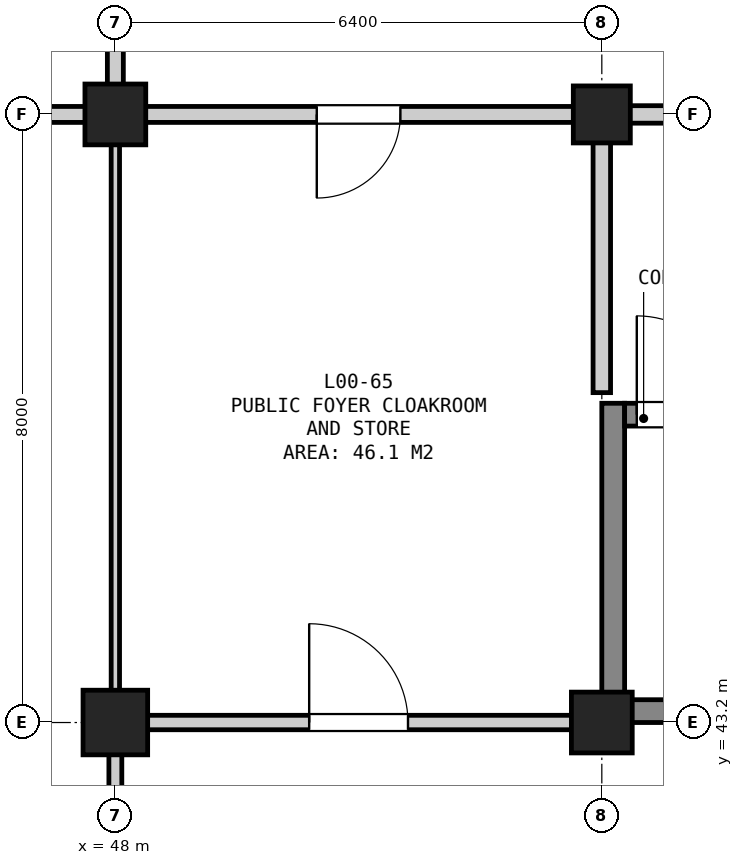
"""IFC4 building model, lengths in metres.
Left out: names, types, materials, properties, quantities, classifications, styles, units other than length and angle.
Written with IfcOpenShell. Run it as: python <this file> out.ifc"""

import sys

from ifc_helpers import new_model, si_unit, direction, frame, frame_2d, origin, origin_2d, place, context, subcontext, project, spatial, rectangle, extrude, element, fill, save


model = new_model("IFC4")
c1 = context("Model", 3, precision=1e-05, world=origin(), true_north=direction((0.0, 1.0)))
c2 = subcontext(c1, "Body", "Model", "MODEL_VIEW")
j1 = project(units=[si_unit("LENGTHUNIT", "METRE"), si_unit("PLANEANGLEUNIT", "RADIAN")], contexts=[c1])
p1 = place(None, origin())
s1 = spatial("IfcSite", under=j1, at=p1, CompositionType="ELEMENT")
p2 = place(p1, origin())
s2 = spatial("IfcBuilding", under=s1, at=p2, CompositionType="ELEMENT")
p3 = place(p2, origin())
s3 = spatial("IfcBuildingStorey", under=s2, at=p3, CompositionType="ELEMENT", Elevation=0.0)
p4 = place(p3, frame((48.0, 43.2, 0.0), z_axis=(0.0, 0.0, 1.0), x_axis=(1.0, 0.0, 0.0)))
e1 = element("IfcColumn", 1, at=p4, inside=s3, PredefinedType="COLUMN", context=c2, shape_type="SweptSolid", body=[
    extrude(rectangle(XDim=0.85, YDim=0.85, at=origin_2d()), origin(), (0.0, 0.0, 1.0), 5.4),
])
for number, where, z_axis, x_axis in (
    (2, (48.0, 51.2, 0.0), (0.0, 0.0, 1.0), (1.0, 0.0, 0.0)),
    (3, (54.4, 43.2, 0.0), (0.0, 0.0, 1.0), (1.0, 0.0, 0.0)),
):
    element("IfcColumn", number, at=place(p3, frame(where, z_axis=z_axis, x_axis=x_axis)), inside=s3, PredefinedType="COLUMN", context=c2, shape_type="SweptSolid", body=[
        extrude(rectangle(XDim=0.8, YDim=0.8, at=origin_2d()), origin(), (0.0, 0.0, 1.0), 5.4),
    ])
p5 = place(p3, frame((54.4, 51.2, 0.0), z_axis=(0.0, 0.0, 1.0), x_axis=(1.0, 0.0, 0.0)))
e4 = element("IfcColumn", 4, at=p5, inside=s3, PredefinedType="COLUMN", context=c2, shape_type="SweptSolid", body=[
    extrude(rectangle(XDim=0.75, YDim=0.75, at=origin_2d()), origin(), (0.0, 0.0, 1.0), 5.4),
])
p6 = place(p3, frame((54.55, 43.2, 0.0), z_axis=(0.0, 0.0, 1.0), x_axis=(0.0, 1.0, 0.0)))
e5 = element("IfcWall", 5, at=p6, inside=s3, PredefinedType="SHEAR", context=c2, shape_type="SweptSolid", body=[
    extrude(rectangle(XDim=4.2, YDim=0.3, at=frame_2d((2.1, 0.0))), origin(), (0.0, 0.0, 1.0), 5.08),
])
p7 = place(p3, frame((54.7, 43.35, 0.0), z_axis=(0.0, 0.0, 1.0), x_axis=(1.0, 0.0, 0.0)))
e6 = element("IfcWall", 6, at=p7, inside=s3, PredefinedType="SHEAR", context=c2, shape_type="SweptSolid", body=[
    extrude(rectangle(XDim=7.4, YDim=0.3, at=frame_2d((3.7, 0.0))), origin(), (0.0, 0.0, 1.0), 5.08),
])
p8 = place(p3, frame((54.7, 47.25, 0.0), z_axis=(0.0, 0.0, 1.0), x_axis=(1.0, 0.0, 0.0)))
e7 = element("IfcWall", 7, at=p8, inside=s3, PredefinedType="SHEAR", context=c2, shape_type="SweptSolid", body=[
    extrude(rectangle(XDim=7.4, YDim=0.3, at=frame_2d((3.7, 0.0))), origin(), (0.0, 0.0, 1.0), 5.08),
])
p9 = place(p8, frame((0.16, 0.0, 0.0)))
e8 = element("IfcOpeningElement", 8, at=p9, cuts=e7, PredefinedType="OPENING", context=c2, shape_type="SweptSolid", body=[
    extrude(rectangle(XDim=1.3, YDim=2.18, at=frame_2d((0.65, 1.09))), frame((0.0, 0.162, 0.0), z_axis=(0.0, -1.0, 0.0), x_axis=(1.0, 0.0, 0.0)), (0.0, 0.0, 1.0), 0.324),
])
p10 = place(p3, frame((54.54, 51.2, 0.0), z_axis=(0.0, 0.0, 1.0), x_axis=(1.0, 0.0, 0.0)))
e9 = element("IfcWall", 9, at=p10, inside=s3, PredefinedType="SOLIDWALL", context=c2, shape_type="SweptSolid", body=[
    extrude(rectangle(XDim=7.72, YDim=0.23, at=frame_2d((3.86, 0.0))), origin(), (0.0, 0.0, 1.0), 4.675),
])
p11 = place(p10, frame((3.56, 0.0, 0.0)))
e10 = element("IfcOpeningElement", 10, at=p11, cuts=e9, PredefinedType="OPENING", context=c2, shape_type="SweptSolid", body=[
    extrude(rectangle(XDim=1.4, YDim=2.2, at=frame_2d((0.7, 1.1))), frame((0.0, 0.127, 0.0), z_axis=(0.0, -1.0, 0.0), x_axis=(1.0, 0.0, 0.0)), (0.0, 0.0, 1.0), 0.254),
])
p12 = place(p3, frame((54.4, 47.54, 0.0), z_axis=(0.0, 0.0, 1.0), x_axis=(0.0, 1.0, 0.0)))
e11 = element("IfcWall", 11, at=p12, inside=s3, PredefinedType="SOLIDWALL", context=c2, shape_type="SweptSolid", body=[
    extrude(rectangle(XDim=3.52, YDim=0.23, at=frame_2d((1.76, 0.0))), origin(), (0.0, 0.0, 1.0), 4.475),
])
p13 = place(p3, frame((41.74, 51.2, 0.0), z_axis=(0.0, 0.0, 1.0), x_axis=(1.0, 0.0, 0.0)))
e12 = element("IfcWall", 12, at=p13, inside=s3, PredefinedType="SOLIDWALL", context=c2, shape_type="SweptSolid", body=[
    extrude(rectangle(XDim=6.12, YDim=0.21, at=frame_2d((3.06, 0.0))), origin(), (0.0, 0.0, 1.0), 4.425),
])
p14 = place(p13, frame((2.36, 0.0, 0.0)))
e13 = element("IfcOpeningElement", 13, at=p14, cuts=e12, PredefinedType="OPENING", context=c2, shape_type="SweptSolid", body=[
    extrude(rectangle(XDim=1.4, YDim=2.2, at=frame_2d((0.7, 1.1))), frame((0.0, 0.117, 0.0), z_axis=(0.0, -1.0, 0.0), x_axis=(1.0, 0.0, 0.0)), (0.0, 0.0, 1.0), 0.234),
])
p15 = place(p3, frame((48.0, 51.34, 0.0), z_axis=(0.0, 0.0, 1.0), x_axis=(0.0, 1.0, 0.0)))
e14 = element("IfcWall", 14, at=p15, inside=s3, PredefinedType="SOLIDWALL", context=c2, shape_type="SweptSolid", body=[
    extrude(rectangle(XDim=7.72, YDim=0.21, at=frame_2d((3.86, 0.0))), origin(), (0.0, 0.0, 1.0), 4.575),
])
p16 = place(p15, frame((3.06, 0.0, 0.0)))
e15 = element("IfcOpeningElement", 15, at=p16, cuts=e14, PredefinedType="OPENING", context=c2, shape_type="SweptSolid", body=[
    extrude(rectangle(XDim=1.6, YDim=2.2, at=frame_2d((0.8, 1.1))), frame((0.0, 0.117, 0.0), z_axis=(0.0, -1.0, 0.0), x_axis=(1.0, 0.0, 0.0)), (0.0, 0.0, 1.0), 0.234),
])
p17 = place(p3, frame((48.14, 51.2, 0.0), z_axis=(0.0, 0.0, 1.0), x_axis=(1.0, 0.0, 0.0)))
e16 = element("IfcWall", 16, at=p17, inside=s3, PredefinedType="SOLIDWALL", context=c2, shape_type="SweptSolid", body=[
    extrude(rectangle(XDim=6.26, YDim=0.21, at=frame_2d((3.13, 0.0))), origin(), (0.0, 0.0, 1.0), 4.475),
])
p18 = place(p17, frame((2.51, 0.0, 0.0)))
e17 = element("IfcOpeningElement", 17, at=p18, cuts=e16, PredefinedType="OPENING", context=c2, shape_type="SweptSolid", body=[
    extrude(rectangle(XDim=1.1, YDim=2.15, at=frame_2d((0.55, 1.075))), frame((0.0, 0.117, 0.0), z_axis=(0.0, -1.0, 0.0), x_axis=(1.0, 0.0, 0.0)), (0.0, 0.0, 1.0), 0.234),
])
p19 = place(p3, frame((48.14, 43.2, 0.0), z_axis=(0.0, 0.0, 1.0), x_axis=(1.0, 0.0, 0.0)))
e18 = element("IfcWall", 18, at=p19, inside=s3, PredefinedType="PARTITIONING", context=c2, shape_type="SweptSolid", body=[
    extrude(rectangle(XDim=6.42, YDim=0.19, at=frame_2d((3.21, 0.0))), origin(), (0.0, 0.0, 1.0), 4.475),
])
p20 = place(p19, frame((2.41, 0.0, 0.0)))
e19 = element("IfcOpeningElement", 19, at=p20, cuts=e18, PredefinedType="OPENING", context=c2, shape_type="SweptSolid", body=[
    extrude(rectangle(XDim=1.3, YDim=2.15, at=frame_2d((0.65, 1.075))), frame((0.0, 0.107, 0.0), z_axis=(0.0, -1.0, 0.0), x_axis=(1.0, 0.0, 0.0)), (0.0, 0.0, 1.0), 0.214),
])
p21 = place(p3, frame((48.0, 36.205, 0.0), z_axis=(0.0, 0.0, 1.0), x_axis=(0.0, 1.0, 0.0)))
e20 = element("IfcWall", 20, at=p21, inside=s3, PredefinedType="PARTITIONING", context=c2, shape_type="SweptSolid", body=[
    extrude(rectangle(XDim=6.855, YDim=0.17, at=frame_2d((3.427, 0.0))), origin(), (0.0, 0.0, 1.0), 4.475),
])
p22 = place(p3, frame((48.0, 43.34, 0.0), z_axis=(0.0, 0.0, 1.0), x_axis=(0.0, 1.0, 0.0)))
e21 = element("IfcWall", 21, at=p22, inside=s3, PredefinedType="PARTITIONING", context=c2, shape_type="SweptSolid", body=[
    extrude(rectangle(XDim=7.72, YDim=0.11, at=frame_2d((3.86, 0.0))), origin(), (0.0, 0.0, 1.0), 4.575),
])
p23 = place(p9, origin())
e22 = element("IfcDoor", 22, at=p23, inside=s3, OperationType="SINGLE_SWING_LEFT", PredefinedType="DOOR", context=c2, shape_type="SweptSolid", body=[
    extrude(rectangle(XDim=1.3, YDim=2.18, at=frame_2d((0.65, 1.09))), frame((0.0, 0.025, 0.0), z_axis=(0.0, -1.0, 0.0), x_axis=(1.0, 0.0, 0.0)), (0.0, 0.0, 1.0), 0.05),
])
fill(e8, e22)
p24 = place(p20, origin())
e23 = element("IfcDoor", 23, at=p24, inside=s3, OperationType="SINGLE_SWING_LEFT", PredefinedType="DOOR", context=c2, shape_type="SweptSolid", body=[
    extrude(rectangle(XDim=1.3, YDim=2.15, at=frame_2d((0.65, 1.075))), frame((0.0, 0.025, 0.0), z_axis=(0.0, -1.0, 0.0), x_axis=(1.0, 0.0, 0.0)), (0.0, 0.0, 1.0), 0.05),
])
fill(e19, e23)
p25 = place(p18, frame((1.1, 0.0, 0.0), z_axis=(0.0, 0.0, 1.0), x_axis=(-1.0, 0.0, 0.0)))
e24 = element("IfcDoor", 24, at=p25, inside=s3, OperationType="SINGLE_SWING_RIGHT", PredefinedType="DOOR", context=c2, shape_type="SweptSolid", body=[
    extrude(rectangle(XDim=1.1, YDim=2.15, at=frame_2d((0.55, 1.075))), frame((0.0, 0.025, 0.0), z_axis=(0.0, -1.0, 0.0), x_axis=(1.0, 0.0, 0.0)), (0.0, 0.0, 1.0), 0.05),
])
fill(e17, e24)
save(model, sys.argv[1])
